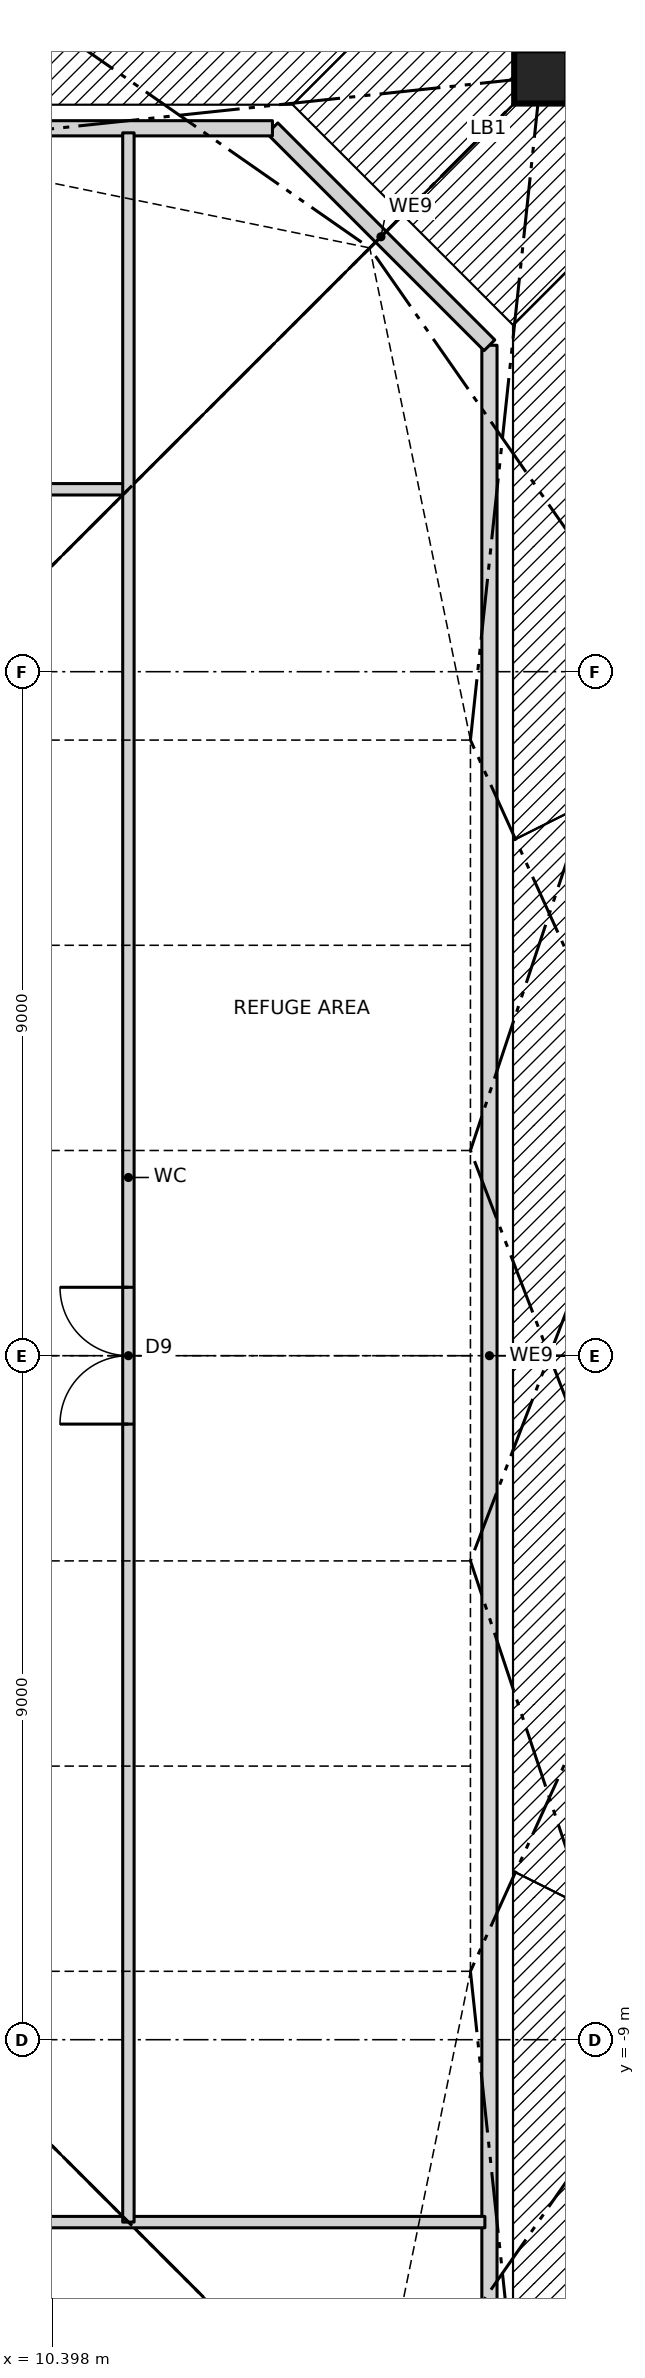
"""IFC4 building model, lengths in metres.
Left out: names, types, materials, properties, quantities, classifications, styles, units other than length and angle.
Written with IfcOpenShell. Run it as: python <this file> out.ifc"""

import sys

from ifc_helpers import new_model, si_unit, direction, frame, frame_2d, origin, origin_2d, place, context, subcontext, project, spatial, rectangle, hollow_rectangle, extrude, clip, halfspace, element, fill, save


model = new_model("IFC4")
c1 = context("Model", 3, precision=1e-05, world=origin(), true_north=direction((0.0, 1.0)))
c2 = subcontext(c1, "Body", "Model", "MODEL_VIEW")
j1 = project(units=[si_unit("LENGTHUNIT", "METRE"), si_unit("PLANEANGLEUNIT", "RADIAN")], contexts=[c1])
p1 = place(None, origin())
s1 = spatial("IfcSite", under=j1, at=p1, CompositionType="ELEMENT")
p2 = place(p1, origin())
s2 = spatial("IfcBuilding", under=s1, at=p2, CompositionType="ELEMENT")
p3 = place(p2, frame((0.0, 0.0, 209.0)))
s3 = spatial("IfcBuildingStorey", under=s2, at=p3, CompositionType="ELEMENT", Elevation=209.0)
p4 = place(p3, frame((18.15, -9.45, 0.0), z_axis=(-0.343583115532, 0.206127500627, 0.91622164142), x_axis=(-0.514454704863, -0.857517554715, 0.0)))
e1 = element("IfcColumn", 1, at=p4, inside=s3, PredefinedType="COLUMN", context=c2, shape_type="Clipping", body=[
    clip(clip(extrude(hollow_rectangle(XDim=0.7, YDim=0.7, WallThickness=0.06, at=origin_2d()), origin(), (0.0, 0.0, 1.0), 6.549), halfspace(frame((0.0, 0.0, 0.0), z_axis=(0.0, -0.400671815572, -0.91622164142), x_axis=(-0.514454704863, 0.785676141527, -0.343583115532)), False)), halfspace(frame((0.0, 2.404, 5.497), z_axis=(0.0, 0.400671815572, 0.91622164142), x_axis=(-0.514454704863, 0.785676141527, -0.343583115532)), False)),
])
p5 = place(p3, frame((18.15, -3.15, 0.0), z_axis=(-0.350261033367, 0.070044605522, 0.934029422311), x_axis=(-0.196095673508, -0.980584767795, 0.0)))
e2 = element("IfcColumn", 2, at=p5, inside=s3, PredefinedType="COLUMN", context=c2, shape_type="Clipping", body=[
    clip(clip(extrude(hollow_rectangle(XDim=0.7, YDim=0.7, WallThickness=0.06, at=origin_2d()), origin(), (0.0, 0.0, 1.0), 6.424), halfspace(frame((0.0, 0.0, 0.0), z_axis=(0.0, -0.357196078167, -0.934029422311), x_axis=(-0.196095673508, 0.91589502419, -0.350261033367)), False)), halfspace(frame((0.0, 2.143, 5.604), z_axis=(0.0, 0.357196078167, 0.934029422311), x_axis=(-0.196095673508, 0.91589502419, -0.350261033367)), False)),
])
p6 = place(p3, frame((18.15, 3.15, 0.0), z_axis=(-0.350261033367, -0.070044605522, 0.934029422311), x_axis=(0.196095673508, -0.980584767795, 0.0)))
e3 = element("IfcColumn", 3, at=p6, inside=s3, PredefinedType="COLUMN", context=c2, shape_type="Clipping", body=[
    clip(clip(extrude(hollow_rectangle(XDim=0.7, YDim=0.7, WallThickness=0.06, at=origin_2d()), origin(), (0.0, 0.0, 1.0), 6.424), halfspace(frame((0.0, 0.0, 0.0), z_axis=(0.0, -0.357196078167, -0.934029422311), x_axis=(0.196095673508, 0.91589502419, -0.350261033367)), False)), halfspace(frame((0.0, 2.143, 5.604), z_axis=(0.0, 0.357196078167, 0.934029422311), x_axis=(0.196095673508, 0.91589502419, -0.350261033367)), False)),
])
p7 = place(p3, frame((18.15, 9.45, 0.0), z_axis=(-0.343583115532, -0.206127500627, 0.91622164142), x_axis=(0.514454704863, -0.857517554715, 0.0)))
e4 = element("IfcColumn", 4, at=p7, inside=s3, PredefinedType="COLUMN", context=c2, shape_type="Clipping", body=[
    clip(clip(extrude(hollow_rectangle(XDim=0.7, YDim=0.7, WallThickness=0.06, at=origin_2d()), origin(), (0.0, 0.0, 1.0), 6.549), halfspace(frame((0.0, 0.0, 0.0), z_axis=(0.0, -0.400671815572, -0.91622164142), x_axis=(0.514454704863, 0.785676141527, -0.343583115532)), False)), halfspace(frame((0.0, 2.404, 5.497), z_axis=(0.0, 0.400671815572, 0.91622164142), x_axis=(0.514454704863, 0.785676141527, -0.343583115532)), False)),
])
p8 = place(p3, frame((16.826, 16.826, 0.0), z_axis=(-0.331294578225, -0.331294578225, 0.883452208599), x_axis=(0.707106781187, -0.707106781187, 0.0)))
e5 = element("IfcColumn", 5, at=p8, inside=s3, PredefinedType="COLUMN", context=c2, shape_type="Clipping", body=[
    clip(clip(extrude(hollow_rectangle(XDim=0.7, YDim=0.7, WallThickness=0.22, at=origin_2d()), origin(), (0.0, 0.0, 1.0), 6.792), halfspace(frame((0.0, 0.0, 0.0), z_axis=(0.0, -0.468521285666, -0.883452208599), x_axis=(0.707106781187, 0.624695047554, -0.331294578225)), False)), halfspace(frame((0.0, 2.811, 5.301), z_axis=(0.0, 0.468521285666, 0.883452208599), x_axis=(0.707106781187, 0.624695047554, -0.331294578225)), False)),
])
p9 = place(p3, frame((16.15, -13.295, 0.0), z_axis=(0.0, 0.0, 1.0), x_axis=(0.0, 1.0, 0.0)))
e6 = element("IfcWall", 6, at=p9, inside=s3, PredefinedType="PARTITIONING", context=c2, shape_type="SweptSolid", body=[
    extrude(rectangle(XDim=26.59, YDim=0.2, at=frame_2d((13.295, 0.0))), origin(), (0.0, 0.0, 1.0), 5.7),
])
p10 = place(p3, frame((16.15, 13.295, 0.0), z_axis=(0.0, 0.0, 1.0), x_axis=(-0.707106781187, 0.707106781187, 0.0)))
e7 = element("IfcWall", 7, at=p10, inside=s3, PredefinedType="PARTITIONING", context=c2, shape_type="SweptSolid", body=[
    extrude(rectangle(XDim=4.038, YDim=0.2, at=frame_2d((2.019, 0.0))), origin(), (0.0, 0.0, 1.0), 5.7),
])
p11 = place(p3, frame((13.295, 16.15, 0.0), z_axis=(0.0, 0.0, 1.0), x_axis=(-1.0, 0.0, 0.0)))
e8 = element("IfcWall", 8, at=p11, inside=s3, PredefinedType="PARTITIONING", context=c2, shape_type="SweptSolid", body=[
    extrude(rectangle(XDim=26.59, YDim=0.2, at=frame_2d((13.295, 0.0))), origin(), (0.0, 0.0, 1.0), 5.7),
])
p12 = place(p3, frame((-11.4, -11.4, 0.0), z_axis=(0.0, 0.0, 1.0), x_axis=(1.0, 0.0, 0.0)))
e9 = element("IfcWall", 9, at=p12, inside=s3, PredefinedType="PARTITIONING", context=c2, shape_type="SweptSolid", body=[
    extrude(rectangle(XDim=27.49, YDim=0.15, at=frame_2d((13.745, 0.0))), origin(), (0.0, 0.0, 1.0), 5.77),
])
p13 = place(p12, frame((4.1, 0.0, 0.0)))
e10 = element("IfcOpeningElement", 10, at=p13, cuts=e9, PredefinedType="OPENING", context=c2, shape_type="SweptSolid", body=[
    extrude(rectangle(XDim=1.8, YDim=2.1, at=frame_2d((0.9, 1.05))), frame((0.0, 0.085, 0.0), z_axis=(0.0, -1.0, 0.0), x_axis=(1.0, 0.0, 0.0)), (0.0, 0.0, 1.0), 0.17),
])
p14 = place(p12, frame((12.6, 0.0, 0.0)))
e11 = element("IfcOpeningElement", 11, at=p14, cuts=e9, PredefinedType="OPENING", context=c2, shape_type="SweptSolid", body=[
    extrude(rectangle(XDim=1.8, YDim=2.1, at=frame_2d((0.9, 1.05))), frame((0.0, 0.085, 0.0), z_axis=(0.0, -1.0, 0.0), x_axis=(1.0, 0.0, 0.0)), (0.0, 0.0, 1.0), 0.17),
])
p15 = place(p12, frame((19.0, 0.0, 0.0)))
e12 = element("IfcOpeningElement", 12, at=p15, cuts=e9, PredefinedType="OPENING", context=c2, shape_type="SweptSolid", body=[
    extrude(rectangle(XDim=1.8, YDim=2.1, at=frame_2d((0.9, 1.05))), frame((0.0, 0.085, 0.0), z_axis=(0.0, -1.0, 0.0), x_axis=(1.0, 0.0, 0.0)), (0.0, 0.0, 1.0), 0.17),
])
p16 = place(p3, frame((-16.09, 11.4, 0.0), z_axis=(0.0, 0.0, 1.0), x_axis=(1.0, 0.0, 0.0)))
e13 = element("IfcWall", 13, at=p16, inside=s3, PredefinedType="PARTITIONING", context=c2, shape_type="SweptSolid", body=[
    extrude(rectangle(XDim=27.49, YDim=0.15, at=frame_2d((13.745, 0.0))), origin(), (0.0, 0.0, 1.0), 5.77),
])
p17 = place(p16, frame((23.09, 0.0, 0.0)))
e14 = element("IfcOpeningElement", 14, at=p17, cuts=e13, PredefinedType="OPENING", context=c2, shape_type="SweptSolid", body=[
    extrude(rectangle(XDim=1.8, YDim=2.1, at=frame_2d((0.9, 1.05))), frame((0.0, 0.085, 0.0), z_axis=(0.0, -1.0, 0.0), x_axis=(1.0, 0.0, 0.0)), (0.0, 0.0, 1.0), 0.17),
])
p18 = place(p16, frame((15.59, 0.0, 0.0)))
e15 = element("IfcOpeningElement", 15, at=p18, cuts=e13, PredefinedType="OPENING", context=c2, shape_type="SweptSolid", body=[
    extrude(rectangle(XDim=1.8, YDim=2.1, at=frame_2d((0.9, 1.05))), frame((0.0, 0.085, 0.0), z_axis=(0.0, -1.0, 0.0), x_axis=(1.0, 0.0, 0.0)), (0.0, 0.0, 1.0), 0.17),
])
p19 = place(p16, frame((7.69, 0.0, 0.0)))
e16 = element("IfcOpeningElement", 16, at=p19, cuts=e13, PredefinedType="OPENING", context=c2, shape_type="SweptSolid", body=[
    extrude(rectangle(XDim=1.8, YDim=2.1, at=frame_2d((0.9, 1.05))), frame((0.0, 0.085, 0.0), z_axis=(0.0, -1.0, 0.0), x_axis=(1.0, 0.0, 0.0)), (0.0, 0.0, 1.0), 0.17),
])
p20 = place(p3, frame((11.4, -11.4, 0.0), z_axis=(0.0, 0.0, 1.0), x_axis=(0.0, 1.0, 0.0)))
e17 = element("IfcWall", 17, at=p20, inside=s3, PredefinedType="PARTITIONING", context=c2, shape_type="SweptSolid", body=[
    extrude(rectangle(XDim=27.49, YDim=0.15, at=frame_2d((13.745, 0.0))), origin(), (0.0, 0.0, 1.0), 5.77),
])
p21 = place(p20, frame((10.5, 0.0, 0.0)))
e18 = element("IfcOpeningElement", 18, at=p21, cuts=e17, PredefinedType="OPENING", context=c2, shape_type="SweptSolid", body=[
    extrude(rectangle(XDim=1.8, YDim=2.1, at=frame_2d((0.9, 1.05))), frame((0.0, 0.085, 0.0), z_axis=(0.0, -1.0, 0.0), x_axis=(1.0, 0.0, 0.0)), (0.0, 0.0, 1.0), 0.17),
])
p22 = place(p21, origin())
e19 = element("IfcDoor", 19, at=p22, inside=s3, OperationType="DOUBLE_DOOR_SINGLE_SWING", PredefinedType="DOOR", context=c2, shape_type="SweptSolid", body=[
    extrude(rectangle(XDim=1.8, YDim=2.1, at=frame_2d((0.9, 1.05))), frame((0.0, 0.025, 0.0), z_axis=(0.0, -1.0, 0.0), x_axis=(1.0, 0.0, 0.0)), (0.0, 0.0, 1.0), 0.05),
])
fill(e18, e19)
save(model, sys.argv[1])
